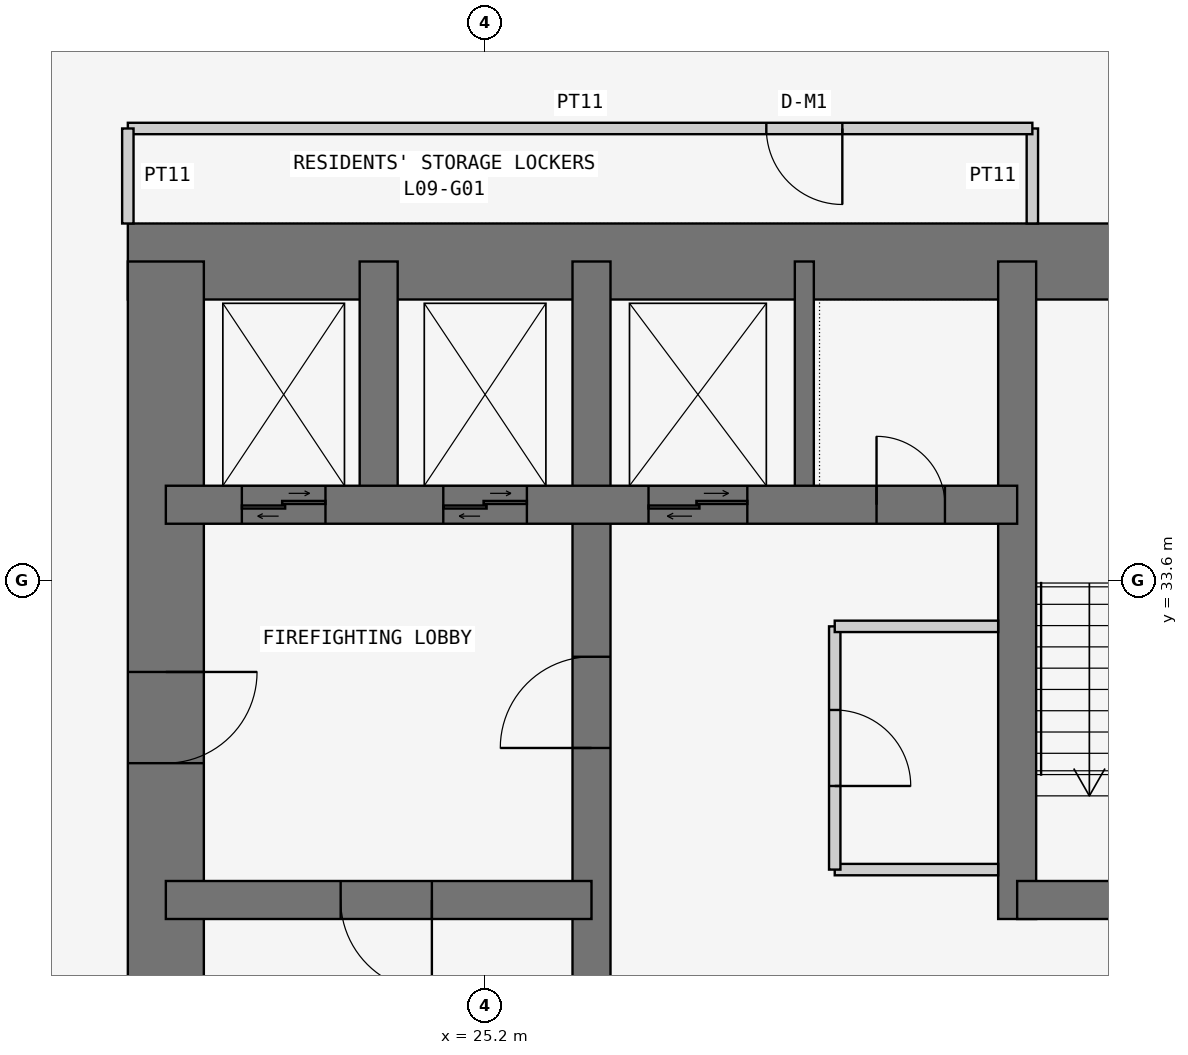
"""IFC4 building model, lengths in metres.
Left out: names, types, materials, properties, quantities, classifications, styles, units other than length and angle.
Written with IfcOpenShell. Run it as: python <this file> out.ifc"""

import sys

from ifc_helpers import new_model, si_unit, direction, frame, frame_2d, origin, place, context, subcontext, project, spatial, rectangle, extrude, element, fill, save


model = new_model("IFC4")
c1 = context("Model", 3, precision=1e-05, world=origin(), true_north=direction((0.0, 1.0)))
c2 = subcontext(c1, "Body", "Model", "MODEL_VIEW")
j1 = project(units=[si_unit("LENGTHUNIT", "METRE"), si_unit("PLANEANGLEUNIT", "RADIAN")], contexts=[c1])
p1 = place(None, origin())
s1 = spatial("IfcSite", under=j1, at=p1, CompositionType="ELEMENT")
p2 = place(p1, origin())
s2 = spatial("IfcBuilding", under=s1, at=p2, CompositionType="ELEMENT")
p3 = place(p2, frame((0.0, 0.0, 41.7)))
s3 = spatial("IfcBuildingStorey", under=s2, at=p3, CompositionType="ELEMENT", Elevation=41.7)
p4 = place(p3, frame((37.8, 37.8, 0.0), z_axis=(0.0, 0.0, 1.0), x_axis=(-1.0, 0.0, 0.0)))
e1 = element("IfcWall", 1, at=p4, inside=s3, PredefinedType="SHEAR", context=c2, shape_type="SweptSolid", body=[
    extrude(rectangle(XDim=17.3, YDim=1.0, at=frame_2d((8.65, 0.0))), origin(), (0.0, 0.0, 1.0), 3.6),
])
p5 = place(p3, frame((21.0, 37.8, 0.0), z_axis=(0.0, 0.0, 1.0), x_axis=(0.0, -1.0, 0.0)))
e2 = element("IfcWall", 2, at=p5, inside=s3, PredefinedType="SHEAR", context=c2, shape_type="SweptSolid", body=[
    extrude(rectangle(XDim=17.3, YDim=1.0, at=frame_2d((8.65, 0.0))), origin(), (0.0, 0.0, 1.0), 3.6),
])
p6 = place(p5, frame((5.4, 0.0, 0.0)))
e3 = element("IfcOpeningElement", 3, at=p6, cuts=e2, PredefinedType="OPENING", context=c2, shape_type="SweptSolid", body=[
    extrude(rectangle(XDim=1.2, YDim=2.1, at=frame_2d((0.6, 1.05))), frame((0.0, 0.51, 0.0), z_axis=(0.0, -1.0, 0.0), x_axis=(1.0, 0.0, 0.0)), (0.0, 0.0, 1.0), 1.02),
])
p7 = place(p3, frame((26.6, 21.0, 0.0), z_axis=(0.0, 0.0, 1.0), x_axis=(0.0, 1.0, 0.0)))
e4 = element("IfcWall", 4, at=p7, inside=s3, PredefinedType="SHEAR", context=c2, shape_type="SweptSolid", body=[
    extrude(rectangle(XDim=16.8, YDim=0.5, at=frame_2d((8.4, 0.0))), origin(), (0.0, 0.0, 1.0), 3.6),
])
p8 = place(p7, frame((10.4, 0.0, 0.0)))
e5 = element("IfcOpeningElement", 5, at=p8, cuts=e4, PredefinedType="OPENING", context=c2, shape_type="SweptSolid", body=[
    extrude(rectangle(XDim=1.2, YDim=2.1, at=frame_2d((0.6, 1.05))), frame((0.0, 0.26, 0.0), z_axis=(0.0, -1.0, 0.0), x_axis=(1.0, 0.0, 0.0)), (0.0, 0.0, 1.0), 0.52),
])
p9 = place(p3, frame((21.0, 29.4, 0.0), z_axis=(0.0, 0.0, 1.0), x_axis=(1.0, 0.0, 0.0)))
e6 = element("IfcWall", 6, at=p9, inside=s3, PredefinedType="SHEAR", context=c2, shape_type="SweptSolid", body=[
    extrude(rectangle(XDim=5.6, YDim=0.5, at=frame_2d((2.8, 0.0))), origin(), (0.0, 0.0, 1.0), 3.6),
])
p10 = place(p9, frame((2.3, 0.0, 0.0)))
e7 = element("IfcOpeningElement", 7, at=p10, cuts=e6, PredefinedType="OPENING", context=c2, shape_type="SweptSolid", body=[
    extrude(rectangle(XDim=1.2, YDim=2.1, at=frame_2d((0.6, 1.05))), frame((0.0, 0.26, 0.0), z_axis=(0.0, -1.0, 0.0), x_axis=(1.0, 0.0, 0.0)), (0.0, 0.0, 1.0), 0.52),
])
p11 = place(p3, frame((21.0, 34.6, 0.0), z_axis=(0.0, 0.0, 1.0), x_axis=(1.0, 0.0, 0.0)))
e8 = element("IfcWall", 8, at=p11, inside=s3, PredefinedType="SHEAR", context=c2, shape_type="SweptSolid", body=[
    extrude(rectangle(XDim=11.2, YDim=0.5, at=frame_2d((5.6, 0.0))), origin(), (0.0, 0.0, 1.0), 3.6),
])
p12 = place(p11, frame((9.35, 0.0, 0.0)))
e9 = element("IfcOpeningElement", 9, at=p12, cuts=e8, PredefinedType="OPENING", context=c2, shape_type="SweptSolid", body=[
    extrude(rectangle(XDim=0.9, YDim=2.1, at=frame_2d((0.45, 1.05))), frame((0.0, 0.26, 0.0), z_axis=(0.0, -1.0, 0.0), x_axis=(1.0, 0.0, 0.0)), (0.0, 0.0, 1.0), 0.52),
])
p13 = place(p11, frame((1.0, 0.0, 0.0)))
e10 = element("IfcOpeningElement", 10, at=p13, cuts=e8, PredefinedType="OPENING", context=c2, shape_type="SweptSolid", body=[
    extrude(rectangle(XDim=1.1, YDim=2.1, at=frame_2d((0.55, 1.05))), frame((0.0, 0.26, 0.0), z_axis=(0.0, -1.0, 0.0), x_axis=(1.0, 0.0, 0.0)), (0.0, 0.0, 1.0), 0.52),
])
p14 = place(p11, frame((3.65, 0.0, 0.0)))
e11 = element("IfcOpeningElement", 11, at=p14, cuts=e8, PredefinedType="OPENING", context=c2, shape_type="SweptSolid", body=[
    extrude(rectangle(XDim=1.1, YDim=2.1, at=frame_2d((0.55, 1.05))), frame((0.0, 0.26, 0.0), z_axis=(0.0, -1.0, 0.0), x_axis=(1.0, 0.0, 0.0)), (0.0, 0.0, 1.0), 0.52),
])
p15 = place(p11, frame((6.35, 0.0, 0.0)))
e12 = element("IfcOpeningElement", 12, at=p15, cuts=e8, PredefinedType="OPENING", context=c2, shape_type="SweptSolid", body=[
    extrude(rectangle(XDim=1.3, YDim=2.1, at=frame_2d((0.65, 1.05))), frame((0.0, 0.26, 0.0), z_axis=(0.0, -1.0, 0.0), x_axis=(1.0, 0.0, 0.0)), (0.0, 0.0, 1.0), 0.52),
])
p16 = place(p3, frame((23.8, 34.6, 0.0), z_axis=(0.0, 0.0, 1.0), x_axis=(0.0, 1.0, 0.0)))
e13 = element("IfcWall", 13, at=p16, inside=s3, PredefinedType="SHEAR", context=c2, shape_type="SweptSolid", body=[
    extrude(rectangle(XDim=3.2, YDim=0.5, at=frame_2d((1.6, 0.0))), origin(), (0.0, 0.0, 1.0), 3.6),
])
p17 = place(p3, frame((32.2, 29.15, 0.0), z_axis=(0.0, 0.0, 1.0), x_axis=(0.0, 1.0, 0.0)))
e14 = element("IfcWall", 14, at=p17, inside=s3, PredefinedType="SHEAR", context=c2, shape_type="SweptSolid", body=[
    extrude(rectangle(XDim=8.65, YDim=0.5, at=frame_2d((4.325, 0.0))), origin(), (0.0, 0.0, 1.0), 3.6),
])
p18 = place(p3, frame((32.2, 29.4, 0.0), z_axis=(0.0, 0.0, 1.0), x_axis=(1.0, 0.0, 0.0)))
e15 = element("IfcWall", 15, at=p18, inside=s3, PredefinedType="SHEAR", context=c2, shape_type="SweptSolid", body=[
    extrude(rectangle(XDim=5.6, YDim=0.5, at=frame_2d((2.8, 0.0))), origin(), (0.0, 0.0, 1.0), 3.6),
])
p19 = place(p18, frame((2.0, 0.0, 0.0)))
e16 = element("IfcOpeningElement", 16, at=p19, cuts=e15, PredefinedType="OPENING", context=c2, shape_type="SweptSolid", body=[
    extrude(rectangle(XDim=1.2, YDim=2.1, at=frame_2d((0.6, 1.05))), frame((0.0, 0.26, 0.0), z_axis=(0.0, -1.0, 0.0), x_axis=(1.0, 0.0, 0.0)), (0.0, 0.0, 1.0), 0.52),
])
p20 = place(p3, frame((29.4, 34.6, 0.0), z_axis=(0.0, 0.0, 1.0), x_axis=(0.0, 1.0, 0.0)))
e17 = element("IfcWall", 17, at=p20, inside=s3, PredefinedType="SHEAR", context=c2, shape_type="SweptSolid", body=[
    extrude(rectangle(XDim=3.2, YDim=0.25, at=frame_2d((1.6, 0.0))), origin(), (0.0, 0.0, 1.0), 3.6),
])
p21 = place(p3, frame((32.4, 38.3, 0.0), z_axis=(0.0, 0.0, 1.0), x_axis=(0.0, 1.0, 0.0)))
e18 = element("IfcWall", 18, at=p21, inside=s3, PredefinedType="PARTITIONING", context=c2, shape_type="SweptSolid", body=[
    extrude(rectangle(XDim=1.25, YDim=0.15, at=frame_2d((0.625, 0.0))), origin(), (0.0, 0.0, 1.0), 3.45),
])
p22 = place(p3, frame((32.4, 39.55, 0.0), z_axis=(0.0, 0.0, 1.0), x_axis=(-1.0, 0.0, 0.0)))
e19 = element("IfcWall", 19, at=p22, inside=s3, PredefinedType="PARTITIONING", context=c2, shape_type="SweptSolid", body=[
    extrude(rectangle(XDim=11.9, YDim=0.15, at=frame_2d((5.95, 0.0))), origin(), (0.0, 0.0, 1.0), 3.45),
])
p23 = place(p22, frame((2.5, 0.0, 0.0)))
e20 = element("IfcOpeningElement", 20, at=p23, cuts=e19, PredefinedType="OPENING", context=c2, shape_type="SweptSolid", body=[
    extrude(rectangle(XDim=1.0, YDim=2.1, at=frame_2d((0.5, 1.05))), frame((0.0, 0.085, 0.0), z_axis=(0.0, -1.0, 0.0), x_axis=(1.0, 0.0, 0.0)), (0.0, 0.0, 1.0), 0.17),
])
p24 = place(p3, frame((20.5, 39.55, 0.0), z_axis=(0.0, 0.0, 1.0), x_axis=(0.0, -1.0, 0.0)))
e21 = element("IfcWall", 21, at=p24, inside=s3, PredefinedType="PARTITIONING", context=c2, shape_type="SweptSolid", body=[
    extrude(rectangle(XDim=1.25, YDim=0.15, at=frame_2d((0.625, 0.0))), origin(), (0.0, 0.0, 1.0), 3.45),
])
p25 = place(p3, frame((31.95, 29.8, 0.0), z_axis=(0.0, 0.0, 1.0), x_axis=(-1.0, 0.0, 0.0)))
e22 = element("IfcWall", 22, at=p25, inside=s3, PredefinedType="PARTITIONING", context=c2, shape_type="SweptSolid", body=[
    extrude(rectangle(XDim=2.15, YDim=0.15, at=frame_2d((1.075, 0.0))), origin(), (0.0, 0.0, 1.0), 3.45),
])
p26 = place(p3, frame((29.8, 29.8, 0.0), z_axis=(0.0, 0.0, 1.0), x_axis=(0.0, 1.0, 0.0)))
e23 = element("IfcWall", 23, at=p26, inside=s3, PredefinedType="PARTITIONING", context=c2, shape_type="SweptSolid", body=[
    extrude(rectangle(XDim=3.2, YDim=0.15, at=frame_2d((1.6, 0.0))), origin(), (0.0, 0.0, 1.0), 3.45),
])
p27 = place(p26, frame((1.1, 0.0, 0.0)))
e24 = element("IfcOpeningElement", 24, at=p27, cuts=e23, PredefinedType="OPENING", context=c2, shape_type="SweptSolid", body=[
    extrude(rectangle(XDim=1.0, YDim=2.1, at=frame_2d((0.5, 1.05))), frame((0.0, 0.085, 0.0), z_axis=(0.0, -1.0, 0.0), x_axis=(1.0, 0.0, 0.0)), (0.0, 0.0, 1.0), 0.17),
])
p28 = place(p3, frame((29.8, 33.0, 0.0), z_axis=(0.0, 0.0, 1.0), x_axis=(1.0, 0.0, 0.0)))
e25 = element("IfcWall", 25, at=p28, inside=s3, PredefinedType="PARTITIONING", context=c2, shape_type="SweptSolid", body=[
    extrude(rectangle(XDim=2.15, YDim=0.15, at=frame_2d((1.075, 0.0))), origin(), (0.0, 0.0, 1.0), 3.45),
])
p29 = place(p23, origin())
e26 = element("IfcDoor", 26, at=p29, inside=s3, OperationType="SINGLE_SWING_LEFT", PredefinedType="DOOR", context=c2, shape_type="SweptSolid", body=[
    extrude(rectangle(XDim=1.0, YDim=2.1, at=frame_2d((0.5, 1.05))), frame((0.0, 0.025, 0.0), z_axis=(0.0, -1.0, 0.0), x_axis=(1.0, 0.0, 0.0)), (0.0, 0.0, 1.0), 0.05),
])
fill(e20, e26)
p30 = place(p6, origin())
e27 = element("IfcDoor", 27, at=p30, inside=s3, OperationType="SINGLE_SWING_LEFT", PredefinedType="DOOR", context=c2, shape_type="SweptSolid", body=[
    extrude(rectangle(XDim=1.2, YDim=2.1, at=frame_2d((0.6, 1.05))), frame((0.0, 0.025, 0.0), z_axis=(0.0, -1.0, 0.0), x_axis=(1.0, 0.0, 0.0)), (0.0, 0.0, 1.0), 0.05),
])
fill(e3, e27)
p31 = place(p10, frame((1.2, 0.0, 0.0), z_axis=(0.0, 0.0, 1.0), x_axis=(-1.0, 0.0, 0.0)))
e28 = element("IfcDoor", 28, at=p31, inside=s3, OperationType="SINGLE_SWING_LEFT", PredefinedType="DOOR", context=c2, shape_type="SweptSolid", body=[
    extrude(rectangle(XDim=1.2, YDim=2.1, at=frame_2d((0.6, 1.05))), frame((0.0, 0.025, 0.0), z_axis=(0.0, -1.0, 0.0), x_axis=(1.0, 0.0, 0.0)), (0.0, 0.0, 1.0), 0.05),
])
fill(e7, e28)
p32 = place(p8, origin())
e29 = element("IfcDoor", 29, at=p32, inside=s3, OperationType="SINGLE_SWING_LEFT", PredefinedType="DOOR", context=c2, shape_type="SweptSolid", body=[
    extrude(rectangle(XDim=1.2, YDim=2.1, at=frame_2d((0.6, 1.05))), frame((0.0, 0.025, 0.0), z_axis=(0.0, -1.0, 0.0), x_axis=(1.0, 0.0, 0.0)), (0.0, 0.0, 1.0), 0.05),
])
fill(e5, e29)
p33 = place(p12, origin())
e30 = element("IfcDoor", 30, at=p33, inside=s3, OperationType="SINGLE_SWING_LEFT", PredefinedType="DOOR", context=c2, shape_type="SweptSolid", body=[
    extrude(rectangle(XDim=0.9, YDim=2.1, at=frame_2d((0.45, 1.05))), frame((0.0, 0.025, 0.0), z_axis=(0.0, -1.0, 0.0), x_axis=(1.0, 0.0, 0.0)), (0.0, 0.0, 1.0), 0.05),
])
fill(e9, e30)
p34 = place(p27, frame((1.0, 0.0, 0.0), z_axis=(0.0, 0.0, 1.0), x_axis=(-1.0, 0.0, 0.0)))
e31 = element("IfcDoor", 31, at=p34, inside=s3, OperationType="SINGLE_SWING_RIGHT", PredefinedType="DOOR", context=c2, shape_type="SweptSolid", body=[
    extrude(rectangle(XDim=1.0, YDim=2.1, at=frame_2d((0.5, 1.05))), frame((0.0, 0.025, 0.0), z_axis=(0.0, -1.0, 0.0), x_axis=(1.0, 0.0, 0.0)), (0.0, 0.0, 1.0), 0.05),
])
fill(e24, e31)
p35 = place(p13, origin())
e32 = element("IfcDoor", 32, at=p35, inside=s3, OperationType="DOUBLE_DOOR_SLIDING", PredefinedType="DOOR", context=c2, shape_type="SweptSolid", body=[
    extrude(rectangle(XDim=1.1, YDim=2.1, at=frame_2d((0.55, 1.05))), frame((0.0, 0.025, 0.0), z_axis=(0.0, -1.0, 0.0), x_axis=(1.0, 0.0, 0.0)), (0.0, 0.0, 1.0), 0.05),
])
fill(e10, e32)
p36 = place(p14, origin())
e33 = element("IfcDoor", 33, at=p36, inside=s3, OperationType="DOUBLE_DOOR_SLIDING", PredefinedType="DOOR", context=c2, shape_type="SweptSolid", body=[
    extrude(rectangle(XDim=1.1, YDim=2.1, at=frame_2d((0.55, 1.05))), frame((0.0, 0.025, 0.0), z_axis=(0.0, -1.0, 0.0), x_axis=(1.0, 0.0, 0.0)), (0.0, 0.0, 1.0), 0.05),
])
fill(e11, e33)
p37 = place(p15, origin())
e34 = element("IfcDoor", 34, at=p37, inside=s3, OperationType="DOUBLE_DOOR_SLIDING", PredefinedType="DOOR", context=c2, shape_type="SweptSolid", body=[
    extrude(rectangle(XDim=1.3, YDim=2.1, at=frame_2d((0.65, 1.05))), frame((0.0, 0.025, 0.0), z_axis=(0.0, -1.0, 0.0), x_axis=(1.0, 0.0, 0.0)), (0.0, 0.0, 1.0), 0.05),
])
fill(e12, e34)
save(model, sys.argv[1])
